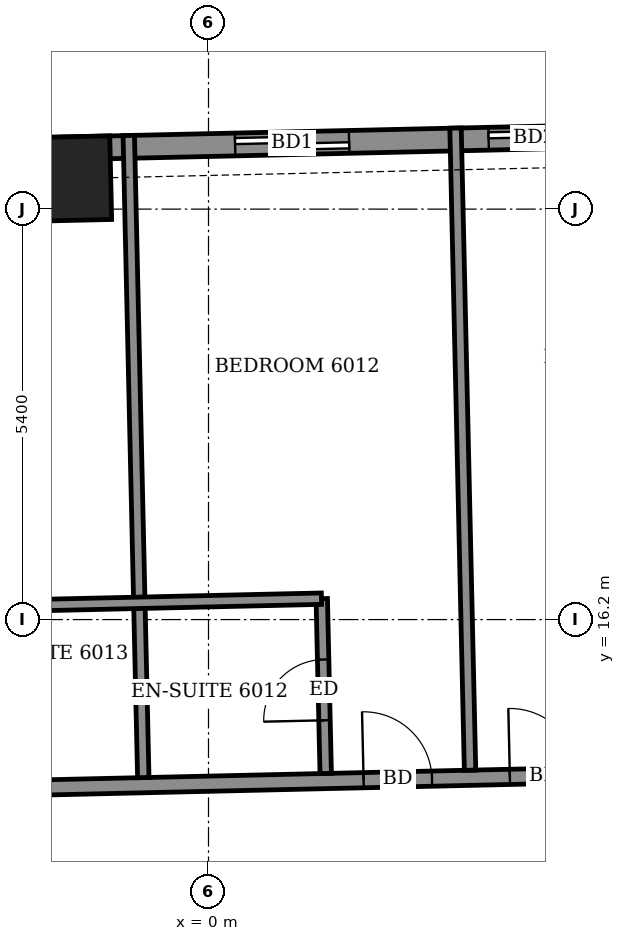
"""IFC4 building model, lengths in metres.
Left out: names, types, materials, properties, quantities, classifications, styles, units other than length and angle.
Written with IfcOpenShell. Run it as: python <this file> out.ifc"""

import sys

from ifc_helpers import new_model, si_unit, direction, frame, frame_2d, origin, origin_2d, place, context, subcontext, project, spatial, rectangle, extrude, element, fill, save


model = new_model("IFC4")
c1 = context("Model", 3, precision=1e-05, world=origin(), true_north=direction((0.0, 1.0)))
c2 = subcontext(c1, "Body", "Model", "MODEL_VIEW")
j1 = project(units=[si_unit("LENGTHUNIT", "METRE"), si_unit("PLANEANGLEUNIT", "RADIAN")], contexts=[c1])
p1 = place(None, origin())
s1 = spatial("IfcSite", under=j1, at=p1, CompositionType="ELEMENT")
p2 = place(p1, origin())
s2 = spatial("IfcBuilding", under=s1, at=p2, CompositionType="ELEMENT")
p3 = place(p2, frame((0.0, 0.0, 238.3)))
s3 = spatial("IfcBuildingStorey", under=s2, at=p3, CompositionType="ELEMENT", Elevation=238.3)
p4 = place(p3, frame((-1.836, 22.001, -0.55), z_axis=(0.0, 0.0, 1.0), x_axis=(-0.999742388325, -0.022697070002, 0.0)))
e1 = element("IfcColumn", 1, at=p4, inside=s3, PredefinedType="COLUMN", context=c2, shape_type="SweptSolid", body=[
    extrude(rectangle(XDim=1.1, YDim=1.1, at=origin_2d()), origin(), (0.0, 0.0, 1.0), 3.6),
])
p5 = place(p3, frame((20.403, 22.905, 0.0), z_axis=(0.0, 0.0, 1.0), x_axis=(-0.99974298964, -0.022670568288, 0.0)))
e2 = element("IfcWall", 2, at=p5, inside=s3, PredefinedType="SOLIDWALL", context=c2, shape_type="SweptSolid", body=[
    extrude(rectangle(XDim=44.509, YDim=0.3, at=frame_2d((22.254, 0.0))), origin(), (0.0, 0.0, 1.0), 2.55),
])
p6 = place(p5, frame((1.62, 0.0, 0.0)))
e3 = element("IfcOpeningElement", 3, at=p6, cuts=e2, PredefinedType="OPENING", context=c2, shape_type="SweptSolid", body=[
    extrude(rectangle(XDim=1.5, YDim=2.4, at=frame_2d((0.75, 1.2))), frame((0.0, 0.16, 0.0), z_axis=(0.0, -1.0, 0.0), x_axis=(1.0, 0.0, 0.0)), (0.0, 0.0, 1.0), 0.32),
])
p7 = place(p5, frame((4.813, 0.0, 0.0)))
e4 = element("IfcOpeningElement", 4, at=p7, cuts=e2, PredefinedType="OPENING", context=c2, shape_type="SweptSolid", body=[
    extrude(rectangle(XDim=1.5, YDim=2.4, at=frame_2d((0.75, 1.2))), frame((0.0, 0.16, 0.0), z_axis=(0.0, -1.0, 0.0), x_axis=(1.0, 0.0, 0.0)), (0.0, 0.0, 1.0), 0.32),
])
p8 = place(p5, frame((9.833, 0.0, 0.0)))
e5 = element("IfcOpeningElement", 5, at=p8, cuts=e2, PredefinedType="OPENING", context=c2, shape_type="SweptSolid", body=[
    extrude(rectangle(XDim=1.5, YDim=2.4, at=frame_2d((0.75, 1.2))), frame((0.0, 0.16, 0.0), z_axis=(0.0, -1.0, 0.0), x_axis=(1.0, 0.0, 0.0)), (0.0, 0.0, 1.0), 0.32),
])
p9 = place(p5, frame((15.522, 0.0, 0.0)))
e6 = element("IfcOpeningElement", 6, at=p9, cuts=e2, PredefinedType="OPENING", context=c2, shape_type="SweptSolid", body=[
    extrude(rectangle(XDim=1.2, YDim=2.4, at=frame_2d((0.6, 1.2))), frame((0.0, 0.16, 0.0), z_axis=(0.0, -1.0, 0.0), x_axis=(1.0, 0.0, 0.0)), (0.0, 0.0, 1.0), 0.32),
])
p10 = place(p5, frame((18.558, 0.0, 0.0)))
e7 = element("IfcOpeningElement", 7, at=p10, cuts=e2, PredefinedType="OPENING", context=c2, shape_type="SweptSolid", body=[
    extrude(rectangle(XDim=1.5, YDim=2.4, at=frame_2d((0.75, 1.2))), frame((0.0, 0.16, 0.0), z_axis=(0.0, -1.0, 0.0), x_axis=(1.0, 0.0, 0.0)), (0.0, 0.0, 1.0), 0.32),
])
p11 = place(p5, frame((23.456, 0.0, 0.0)))
e8 = element("IfcOpeningElement", 8, at=p11, cuts=e2, PredefinedType="OPENING", context=c2, shape_type="SweptSolid", body=[
    extrude(rectangle(XDim=1.5, YDim=2.4, at=frame_2d((0.75, 1.2))), frame((0.0, 0.16, 0.0), z_axis=(0.0, -1.0, 0.0), x_axis=(1.0, 0.0, 0.0)), (0.0, 0.0, 1.0), 0.32),
])
p12 = place(p5, frame((26.89, 0.0, 0.0)))
e9 = element("IfcOpeningElement", 9, at=p12, cuts=e2, PredefinedType="OPENING", context=c2, shape_type="SweptSolid", body=[
    extrude(rectangle(XDim=1.5, YDim=2.4, at=frame_2d((0.75, 1.2))), frame((0.0, 0.16, 0.0), z_axis=(0.0, -1.0, 0.0), x_axis=(1.0, 0.0, 0.0)), (0.0, 0.0, 1.0), 0.32),
])
p13 = place(p5, frame((31.708, 0.0, 0.0)))
e10 = element("IfcOpeningElement", 10, at=p13, cuts=e2, PredefinedType="OPENING", context=c2, shape_type="SweptSolid", body=[
    extrude(rectangle(XDim=1.5, YDim=2.4, at=frame_2d((0.75, 1.2))), frame((0.0, 0.16, 0.0), z_axis=(0.0, -1.0, 0.0), x_axis=(1.0, 0.0, 0.0)), (0.0, 0.0, 1.0), 0.32),
])
p14 = place(p5, frame((35.024, 0.0, 0.0)))
e11 = element("IfcOpeningElement", 11, at=p14, cuts=e2, PredefinedType="OPENING", context=c2, shape_type="SweptSolid", body=[
    extrude(rectangle(XDim=1.5, YDim=2.4, at=frame_2d((0.75, 1.2))), frame((0.0, 0.16, 0.0), z_axis=(0.0, -1.0, 0.0), x_axis=(1.0, 0.0, 0.0)), (0.0, 0.0, 1.0), 0.32),
])
p15 = place(p5, frame((40.173, 0.0, 0.9)))
e12 = element("IfcOpeningElement", 12, at=p15, cuts=e2, PredefinedType="OPENING", context=c2, shape_type="SweptSolid", body=[
    extrude(rectangle(XDim=2.4, YDim=1.5, at=frame_2d((1.2, 0.75))), frame((0.0, 0.16, 0.0), z_axis=(0.0, -1.0, 0.0), x_axis=(1.0, 0.0, 0.0)), (0.0, 0.0, 1.0), 0.32),
])
p16 = place(p3, frame((-27.652, 13.413, 0.0), z_axis=(0.0, 0.0, 1.0), x_axis=(0.999742610679, 0.022687273792, 0.0)))
e13 = element("IfcWall", 13, at=p16, inside=s3, PredefinedType="PARTITIONING", context=c2, shape_type="SweptSolid", body=[
    extrude(rectangle(XDim=50.857, YDim=0.2, at=frame_2d((25.429, 0.0))), origin(), (0.0, 0.0, 1.0), 3.05),
])
p17 = place(p16, frame((49.179, 0.0, 0.0)))
e14 = element("IfcOpeningElement", 14, at=p17, cuts=e13, PredefinedType="OPENING", context=c2, shape_type="SweptSolid", body=[
    extrude(rectangle(XDim=1.0, YDim=2.1, at=frame_2d((0.5, 1.05))), frame((0.0, 0.11, 0.0), z_axis=(0.0, -1.0, 0.0), x_axis=(1.0, 0.0, 0.0)), (0.0, 0.0, 1.0), 0.22),
])
p18 = place(p16, frame((44.9, 0.0, 0.0)))
e15 = element("IfcOpeningElement", 15, at=p18, cuts=e13, PredefinedType="OPENING", context=c2, shape_type="SweptSolid", body=[
    extrude(rectangle(XDim=0.9, YDim=2.1, at=frame_2d((0.45, 1.05))), frame((0.0, 0.11, 0.0), z_axis=(0.0, -1.0, 0.0), x_axis=(1.0, 0.0, 0.0)), (0.0, 0.0, 1.0), 0.22),
])
p19 = place(p16, frame((40.375, 0.0, 0.0)))
e16 = element("IfcOpeningElement", 16, at=p19, cuts=e13, PredefinedType="OPENING", context=c2, shape_type="SweptSolid", body=[
    extrude(rectangle(XDim=0.9, YDim=2.1, at=frame_2d((0.45, 1.05))), frame((0.0, 0.11, 0.0), z_axis=(0.0, -1.0, 0.0), x_axis=(1.0, 0.0, 0.0)), (0.0, 0.0, 1.0), 0.22),
])
p20 = place(p16, frame((38.425, 0.0, 0.0)))
e17 = element("IfcOpeningElement", 17, at=p20, cuts=e13, PredefinedType="OPENING", context=c2, shape_type="SweptSolid", body=[
    extrude(rectangle(XDim=0.9, YDim=2.1, at=frame_2d((0.45, 1.05))), frame((0.0, 0.11, 0.0), z_axis=(0.0, -1.0, 0.0), x_axis=(1.0, 0.0, 0.0)), (0.0, 0.0, 1.0), 0.22),
])
p21 = place(p16, frame((31.625, 0.0, 0.0)))
e18 = element("IfcOpeningElement", 18, at=p21, cuts=e13, PredefinedType="OPENING", context=c2, shape_type="SweptSolid", body=[
    extrude(rectangle(XDim=0.9, YDim=2.1, at=frame_2d((0.45, 1.05))), frame((0.0, 0.11, 0.0), z_axis=(0.0, -1.0, 0.0), x_axis=(1.0, 0.0, 0.0)), (0.0, 0.0, 1.0), 0.22),
])
p22 = place(p16, frame((29.7, 0.0, 0.0)))
e19 = element("IfcOpeningElement", 19, at=p22, cuts=e13, PredefinedType="OPENING", context=c2, shape_type="SweptSolid", body=[
    extrude(rectangle(XDim=0.9, YDim=2.1, at=frame_2d((0.45, 1.05))), frame((0.0, 0.11, 0.0), z_axis=(0.0, -1.0, 0.0), x_axis=(1.0, 0.0, 0.0)), (0.0, 0.0, 1.0), 0.22),
])
p23 = place(p16, frame((22.95, 0.0, 0.0)))
e20 = element("IfcOpeningElement", 20, at=p23, cuts=e13, PredefinedType="OPENING", context=c2, shape_type="SweptSolid", body=[
    extrude(rectangle(XDim=0.9, YDim=2.1, at=frame_2d((0.45, 1.05))), frame((0.0, 0.11, 0.0), z_axis=(0.0, -1.0, 0.0), x_axis=(1.0, 0.0, 0.0)), (0.0, 0.0, 1.0), 0.22),
])
p24 = place(p16, frame((20.95, 0.0, 0.0)))
e21 = element("IfcOpeningElement", 21, at=p24, cuts=e13, PredefinedType="OPENING", context=c2, shape_type="SweptSolid", body=[
    extrude(rectangle(XDim=0.9, YDim=2.1, at=frame_2d((0.45, 1.05))), frame((0.0, 0.11, 0.0), z_axis=(0.0, -1.0, 0.0), x_axis=(1.0, 0.0, 0.0)), (0.0, 0.0, 1.0), 0.22),
])
p25 = place(p16, frame((14.15, 0.0, 0.0)))
e22 = element("IfcOpeningElement", 22, at=p25, cuts=e13, PredefinedType="OPENING", context=c2, shape_type="SweptSolid", body=[
    extrude(rectangle(XDim=0.9, YDim=2.1, at=frame_2d((0.45, 1.05))), frame((0.0, 0.11, 0.0), z_axis=(0.0, -1.0, 0.0), x_axis=(1.0, 0.0, 0.0)), (0.0, 0.0, 1.0), 0.22),
])
p26 = place(p16, frame((12.2, 0.0, 0.0)))
e23 = element("IfcOpeningElement", 23, at=p26, cuts=e13, PredefinedType="OPENING", context=c2, shape_type="SweptSolid", body=[
    extrude(rectangle(XDim=0.9, YDim=2.1, at=frame_2d((0.45, 1.05))), frame((0.0, 0.11, 0.0), z_axis=(0.0, -1.0, 0.0), x_axis=(1.0, 0.0, 0.0)), (0.0, 0.0, 1.0), 0.22),
])
p27 = place(p16, frame((2.05, 0.0, 0.0)))
e24 = element("IfcOpeningElement", 24, at=p27, cuts=e13, PredefinedType="OPENING", context=c2, shape_type="SweptSolid", body=[
    extrude(rectangle(XDim=1.0, YDim=2.1, at=frame_2d((0.5, 1.05))), frame((0.0, 0.11, 0.0), z_axis=(0.0, -1.0, 0.0), x_axis=(1.0, 0.0, 0.0)), (0.0, 0.0, 1.0), 0.22),
])
p28 = place(p16, frame((7.45, 0.0, 0.0)))
e25 = element("IfcOpeningElement", 25, at=p28, cuts=e13, PredefinedType="OPENING", context=c2, shape_type="SweptSolid", body=[
    extrude(rectangle(XDim=0.9, YDim=2.1, at=frame_2d((0.45, 1.05))), frame((0.0, 0.11, 0.0), z_axis=(0.0, -1.0, 0.0), x_axis=(1.0, 0.0, 0.0)), (0.0, 0.0, 1.0), 0.22),
])
p29 = place(p3, frame((-0.858, 14.121, 0.0), z_axis=(0.0, 0.0, 1.0), x_axis=(-0.022622304913, 0.999744082913, 0.0)))
e26 = element("IfcWall", 26, at=p29, inside=s3, PredefinedType="PARTITIONING", context=c2, shape_type="SweptSolid", body=[
    extrude(rectangle(XDim=8.45, YDim=0.15, at=frame_2d((4.225, 0.0))), origin(), (0.0, 0.0, 1.0), 2.5),
])
p30 = place(p3, frame((1.542, 14.175, 0.0), z_axis=(0.0, 0.0, 1.0), x_axis=(-0.022603288534, 0.999744513037, 0.0)))
e27 = element("IfcWall", 27, at=p30, inside=s3, PredefinedType="PARTITIONING", context=c2, shape_type="SweptSolid", body=[
    extrude(rectangle(XDim=2.301, YDim=0.15, at=frame_2d((1.15, 0.0))), origin(), (0.0, 0.0, 1.0), 3.05),
])
p31 = place(p30, frame((0.7, 0.0, 0.0)))
e28 = element("IfcOpeningElement", 28, at=p31, cuts=e27, PredefinedType="OPENING", context=c2, shape_type="SweptSolid", body=[
    extrude(rectangle(XDim=0.8, YDim=2.1, at=frame_2d((0.4, 1.05))), frame((0.0, 0.085, 0.0), z_axis=(0.0, -1.0, 0.0), x_axis=(1.0, 0.0, 0.0)), (0.0, 0.0, 1.0), 0.17),
])
p32 = place(p3, frame((3.441, 14.218, 0.0), z_axis=(0.0, 0.0, 1.0), x_axis=(-0.022593427839, 0.999744735929, 0.0)))
e29 = element("IfcWall", 29, at=p32, inside=s3, PredefinedType="PARTITIONING", context=c2, shape_type="SweptSolid", body=[
    extrude(rectangle(XDim=8.45, YDim=0.15, at=frame_2d((4.225, 0.0))), origin(), (0.0, 0.0, 1.0), 2.5),
])
p33 = place(p3, frame((-3.313, 16.366, 0.0), z_axis=(0.0, 0.0, 1.0), x_axis=(0.99974154664, 0.022734113616, 0.0)))
e30 = element("IfcWall", 30, at=p33, inside=s3, PredefinedType="PARTITIONING", context=c2, shape_type="SweptSolid", body=[
    extrude(rectangle(XDim=4.8, YDim=0.15, at=frame_2d((2.4, 0.0))), origin(), (0.0, 0.0, 1.0), 3.05),
])
p34 = place(p9, origin())
e31 = element("IfcDoor", 31, at=p34, inside=s3, OperationType="SLIDING_TO_LEFT", PredefinedType="DOOR", context=c2, shape_type="SweptSolid", body=[
    extrude(rectangle(XDim=1.2, YDim=2.4, at=frame_2d((0.6, 1.2))), frame((0.0, 0.025, 0.0), z_axis=(0.0, -1.0, 0.0), x_axis=(1.0, 0.0, 0.0)), (0.0, 0.0, 1.0), 0.05),
])
fill(e6, e31)
p35 = place(p10, origin())
e32 = element("IfcDoor", 32, at=p35, inside=s3, OperationType="SLIDING_TO_LEFT", PredefinedType="DOOR", context=c2, shape_type="SweptSolid", body=[
    extrude(rectangle(XDim=1.5, YDim=2.4, at=frame_2d((0.75, 1.2))), frame((0.0, 0.025, 0.0), z_axis=(0.0, -1.0, 0.0), x_axis=(1.0, 0.0, 0.0)), (0.0, 0.0, 1.0), 0.05),
])
fill(e7, e32)
p36 = place(p21, origin())
e33 = element("IfcDoor", 33, at=p36, inside=s3, OperationType="SINGLE_SWING_LEFT", PredefinedType="DOOR", context=c2, shape_type="SweptSolid", body=[
    extrude(rectangle(XDim=0.9, YDim=2.1, at=frame_2d((0.45, 1.05))), frame((0.0, 0.025, 0.0), z_axis=(0.0, -1.0, 0.0), x_axis=(1.0, 0.0, 0.0)), (0.0, 0.0, 1.0), 0.05),
])
fill(e18, e33)
p37 = place(p22, origin())
e34 = element("IfcDoor", 34, at=p37, inside=s3, OperationType="SINGLE_SWING_RIGHT", PredefinedType="DOOR", context=c2, shape_type="SweptSolid", body=[
    extrude(rectangle(XDim=0.9, YDim=2.1, at=frame_2d((0.45, 1.05))), frame((0.0, 0.025, 0.0), z_axis=(0.0, -1.0, 0.0), x_axis=(1.0, 0.0, 0.0)), (0.0, 0.0, 1.0), 0.05),
])
fill(e19, e34)
p38 = place(p31, origin())
e35 = element("IfcDoor", 35, at=p38, inside=s3, OperationType="SINGLE_SWING_RIGHT", PredefinedType="DOOR", context=c2, shape_type="SweptSolid", body=[
    extrude(rectangle(XDim=0.8, YDim=2.1, at=frame_2d((0.4, 1.05))), frame((0.0, 0.025, 0.0), z_axis=(0.0, -1.0, 0.0), x_axis=(1.0, 0.0, 0.0)), (0.0, 0.0, 1.0), 0.05),
])
fill(e28, e35)
save(model, sys.argv[1])
